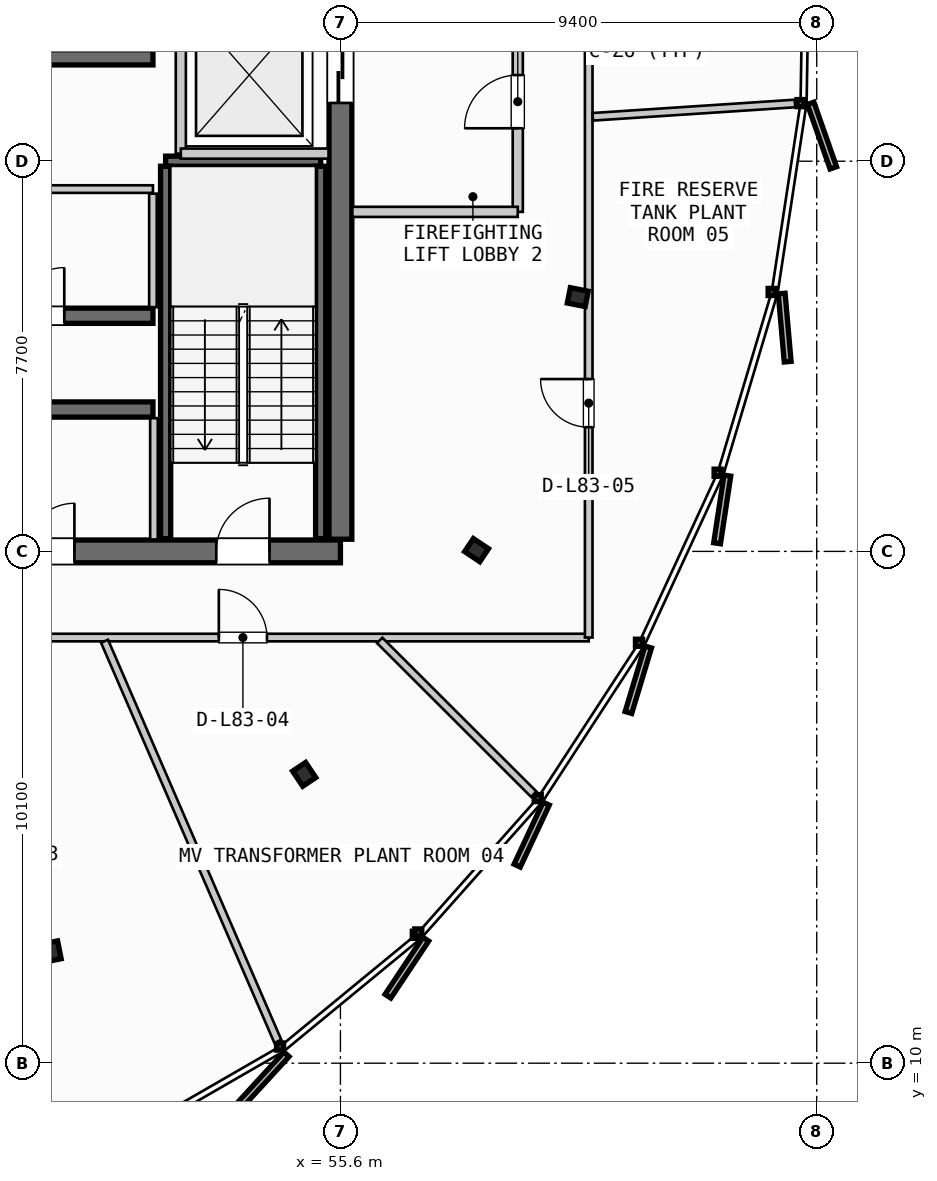
"""IFC4 building model, lengths in metres.
Left out: names, types, materials, properties, quantities, classifications, styles, units other than length and angle.
Written with IfcOpenShell. Run it as: python <this file> out.ifc"""

import sys

from ifc_helpers import new_model, si_unit, direction, frame, frame_2d, origin, origin_2d, place, context, subcontext, project, spatial, rectangle, i_section, extrude, source, transform, mapped, element, fill, save


model = new_model("IFC4")
c1 = context("Model", 3, precision=1e-05, world=origin(), true_north=direction((0.0, 1.0)))
c2 = subcontext(c1, "Body", "Model", "MODEL_VIEW")
j1 = project(units=[si_unit("LENGTHUNIT", "METRE"), si_unit("PLANEANGLEUNIT", "RADIAN")], contexts=[c1])
p1 = place(None, origin())
s1 = spatial("IfcSite", under=j1, at=p1, CompositionType="ELEMENT")
p2 = place(p1, origin())
s2 = spatial("IfcBuilding", under=s1, at=p2, CompositionType="ELEMENT")
p3 = place(p2, frame((0.0, 0.0, 312.3)))
s3 = spatial("IfcBuildingStorey", under=s2, at=p3, CompositionType="ELEMENT", Elevation=312.3)
p4 = place(p3, frame((38.0, 20.1, 0.0), z_axis=(0.0, 0.0, 1.0), x_axis=(1.0, 0.0, 0.0)))
e1 = element("IfcWall", 1, at=p4, inside=s3, PredefinedType="SHEAR", context=c2, shape_type="SweptSolid", body=[
    extrude(rectangle(XDim=17.6, YDim=0.45, at=frame_2d((8.8, 0.0))), origin(), (0.0, 0.0, 1.0), 3.735),
])
p5 = place(p4, frame((1.4, 0.0, 0.0)))
e2 = element("IfcOpeningElement", 2, at=p5, cuts=e1, PredefinedType="OPENING", context=c2, shape_type="SweptSolid", body=[
    extrude(rectangle(XDim=1.05, YDim=2.15, at=frame_2d((0.525, 1.075))), frame((0.0, 0.235, 0.0), z_axis=(0.0, -1.0, 0.0), x_axis=(1.0, 0.0, 0.0)), (0.0, 0.0, 1.0), 0.47),
])
p6 = place(p4, frame((15.15, 0.0, 0.0)))
e3 = element("IfcOpeningElement", 3, at=p6, cuts=e1, PredefinedType="OPENING", context=c2, shape_type="SweptSolid", body=[
    extrude(rectangle(XDim=1.05, YDim=2.15, at=frame_2d((0.525, 1.075))), frame((0.0, 0.235, 0.0), z_axis=(0.0, -1.0, 0.0), x_axis=(1.0, 0.0, 0.0)), (0.0, 0.0, 1.0), 0.47),
])
p7 = place(p4, frame((5.25, 0.0, 0.0)))
e4 = element("IfcOpeningElement", 4, at=p7, cuts=e1, PredefinedType="OPENING", context=c2, shape_type="SweptSolid", body=[
    extrude(rectangle(XDim=0.95, YDim=2.15, at=frame_2d((0.475, 1.075))), frame((0.0, 0.235, 0.0), z_axis=(0.0, -1.0, 0.0), x_axis=(1.0, 0.0, 0.0)), (0.0, 0.0, 1.0), 0.47),
])
p8 = place(p4, frame((11.4, 0.0, 0.0)))
e5 = element("IfcOpeningElement", 5, at=p8, cuts=e1, PredefinedType="OPENING", context=c2, shape_type="SweptSolid", body=[
    extrude(rectangle(XDim=0.95, YDim=2.15, at=frame_2d((0.475, 1.075))), frame((0.0, 0.235, 0.0), z_axis=(0.0, -1.0, 0.0), x_axis=(1.0, 0.0, 0.0)), (0.0, 0.0, 1.0), 0.47),
])
p9 = place(p3, frame((55.6, 20.34, 0.0), z_axis=(0.0, 0.0, 1.0), x_axis=(0.0, 1.0, 0.0)))
e6 = element("IfcWall", 6, at=p9, inside=s3, PredefinedType="SHEAR", context=c2, shape_type="SweptSolid", body=[
    extrude(rectangle(XDim=14.92, YDim=0.45, at=frame_2d((7.46, 0.0))), origin(), (0.0, 0.0, 1.0), 3.735),
])
p10 = place(p9, frame((12.71, 0.0, 0.0)))
e7 = element("IfcOpeningElement", 7, at=p10, cuts=e6, PredefinedType="OPENING", context=c2, shape_type="SweptSolid", body=[
    extrude(rectangle(XDim=1.05, YDim=2.15, at=frame_2d((0.525, 1.075))), frame((0.0, 0.235, 0.0), z_axis=(0.0, -1.0, 0.0), x_axis=(1.0, 0.0, 0.0)), (0.0, 0.0, 1.0), 0.47),
])
p11 = place(p9, frame((8.61, 0.0, 0.0)))
e8 = element("IfcOpeningElement", 8, at=p11, cuts=e6, PredefinedType="OPENING", context=c2, shape_type="SweptSolid", body=[
    extrude(rectangle(XDim=1.1, YDim=2.2, at=frame_2d((0.55, 1.1))), frame((0.0, 0.235, 0.0), z_axis=(0.0, -1.0, 0.0), x_axis=(1.0, 0.0, 0.0)), (0.0, 0.0, 1.0), 0.47),
])
p12 = place(p3, frame((47.65, 22.9, 0.0), z_axis=(0.0, 0.0, 1.0), x_axis=(1.0, 0.0, 0.0)))
e9 = element("IfcWall", 9, at=p12, inside=s3, PredefinedType="SHEAR", context=c2, shape_type="SweptSolid", body=[
    extrude(rectangle(XDim=4.25, YDim=0.3, at=frame_2d((2.125, 0.0))), origin(), (0.0, 0.0, 1.0), 3.735),
])
p13 = place(p3, frame((47.65, 24.75, 0.0), z_axis=(0.0, 0.0, 1.0), x_axis=(1.0, 0.0, 0.0)))
e10 = element("IfcWall", 10, at=p13, inside=s3, PredefinedType="SHEAR", context=c2, shape_type="SweptSolid", body=[
    extrude(rectangle(XDim=4.25, YDim=0.3, at=frame_2d((2.125, 0.0))), origin(), (0.0, 0.0, 1.0), 3.735),
])
p14 = place(p13, frame((1.55, 0.0, 0.0)))
e11 = element("IfcOpeningElement", 11, at=p14, cuts=e10, PredefinedType="OPENING", context=c2, shape_type="SweptSolid", body=[
    extrude(rectangle(XDim=0.95, YDim=2.15, at=frame_2d((0.475, 1.075))), frame((0.0, 0.16, 0.0), z_axis=(0.0, -1.0, 0.0), x_axis=(1.0, 0.0, 0.0)), (0.0, 0.0, 1.0), 0.32),
])
p15 = place(p3, frame((47.65, 29.85, 0.0), z_axis=(0.0, 0.0, 1.0), x_axis=(1.0, 0.0, 0.0)))
e12 = element("IfcWall", 12, at=p15, inside=s3, PredefinedType="SHEAR", context=c2, shape_type="SweptSolid", body=[
    extrude(rectangle(XDim=4.25, YDim=0.3, at=frame_2d((2.125, 0.0))), origin(), (0.0, 0.0, 1.0), 3.735),
])
m1 = source(origin(), c2, "Body", "SweptSolid", [
    extrude(i_section(OverallWidth=0.309, OverallDepth=0.359, WebThickness=0.016, FlangeThickness=0.026, FilletRadius=0.027, at=origin_2d()), origin(), (0.0, 0.0, 1.0), 3.735),
])
for number, where, z_axis, x_axis in (
    (13, (49.902, 12.207, 0.0), (0.0, 0.0, 1.0), (0.195, -0.981, 0.0)),
    (14, (54.885, 15.7, 0.0), (0.0, 0.0, 1.0), (0.556, -0.831, 0.0)),
    (15, (58.287, 20.125, 0.0), (0.0, 0.0, 1.0), (0.831, -0.556, 0.0)),
    (16, (60.284, 25.118, 0.0), (0.0, 0.0, 1.0), (0.981, -0.195, 0.0)),
):
    element("IfcColumn", number, at=place(p3, frame(where, z_axis=z_axis, x_axis=x_axis)), inside=s3, PredefinedType="COLUMN", context=c2, shape_type="MappedRepresentation", body=[
        mapped(m1, transform((0.0, 0.0, 0.0), scale=1.0)),
    ])
p16 = place(p3, frame((52.15, 27.8, 0.0), z_axis=(0.0, 0.0, 1.0), x_axis=(1.0, 0.0, 0.0)))
e17 = element("IfcWall", 17, at=p16, inside=s3, PredefinedType="SHEAR", context=c2, shape_type="SweptSolid", body=[
    extrude(rectangle(XDim=3.06, YDim=0.2, at=frame_2d((1.53, 0.0))), origin(), (0.0, 0.0, 1.0), 3.735),
])
for number, where, z_axis, x_axis in (
    (18, (55.21, 27.7, 0.0), (0.0, 0.0, 1.0), (0.0, -1.0, 0.0)),
    (19, (52.15, 20.35, 0.0), (0.0, 0.0, 1.0), (0.0, 1.0, 0.0)),
):
    element("IfcWall", number, at=place(p3, frame(where, z_axis=z_axis, x_axis=x_axis)), inside=s3, PredefinedType="SHEAR", context=c2, shape_type="SweptSolid", body=[
        extrude(rectangle(XDim=7.35, YDim=0.2, at=frame_2d((3.675, 0.0))), origin(), (0.0, 0.0, 1.0), 3.735),
    ])
p17 = place(p3, frame((52.45, 27.95, 0.0), z_axis=(0.0, 0.0, 1.0), x_axis=(0.0, 1.0, 0.0)))
e20 = element("IfcWall", 20, at=p17, inside=s3, PredefinedType="PARTITIONING", context=c2, shape_type="SweptSolid", body=[
    extrude(rectangle(XDim=3.1, YDim=0.2, at=frame_2d((1.55, 0.0))), origin(), (0.0, 0.0, 1.0), 3.26),
])
p18 = place(p3, frame((52.45, 27.95, 0.0), z_axis=(0.0, 0.0, 1.0), x_axis=(1.0, 0.0, 0.0)))
e21 = element("IfcWall", 21, at=p18, inside=s3, PredefinedType="PARTITIONING", context=c2, shape_type="SweptSolid", body=[
    extrude(rectangle(XDim=2.915, YDim=0.2, at=frame_2d((1.458, 0.0))), origin(), (0.0, 0.0, 1.0), 3.26),
])
p19 = place(p3, frame((59.1, 26.8, 0.0), z_axis=(0.0, 0.0, 1.0), x_axis=(0.0, 1.0, 0.0)))
e22 = element("IfcWall", 22, at=p19, inside=s3, PredefinedType="PARTITIONING", context=c2, shape_type="SweptSolid", body=[
    extrude(rectangle(XDim=4.4, YDim=0.2, at=frame_2d((2.2, 0.0))), origin(), (0.0, 0.0, 1.0), 3.26),
])
p20 = place(p19, frame((1.65, 0.0, 0.0)))
e23 = element("IfcOpeningElement", 23, at=p20, cuts=e22, PredefinedType="OPENING", context=c2, shape_type="SweptSolid", body=[
    extrude(rectangle(XDim=1.05, YDim=2.15, at=frame_2d((0.525, 1.075))), frame((0.0, 0.11, 0.0), z_axis=(0.0, -1.0, 0.0), x_axis=(1.0, 0.0, 0.0)), (0.0, 0.0, 1.0), 0.22),
])
p21 = place(p3, frame((55.835, 26.8, 0.0), z_axis=(0.0, 0.0, 1.0), x_axis=(1.0, 0.0, 0.0)))
e24 = element("IfcWall", 24, at=p21, inside=s3, PredefinedType="PARTITIONING", context=c2, shape_type="SweptSolid", body=[
    extrude(rectangle(XDim=3.265, YDim=0.2, at=frame_2d((1.633, 0.0))), origin(), (0.0, 0.0, 1.0), 3.26),
])
p22 = place(p3, frame((51.92, 20.335, 0.0), z_axis=(0.0, 0.0, 1.0), x_axis=(0.0, 1.0, 0.0)))
e25 = element("IfcWall", 25, at=p22, inside=s3, PredefinedType="PARTITIONING", context=c2, shape_type="SweptSolid", body=[
    extrude(rectangle(XDim=2.395, YDim=0.15, at=frame_2d((1.198, 0.0))), origin(), (0.0, 0.0, 1.0), 3.26),
])
p23 = place(p3, frame((47.65, 27.25, 0.0), z_axis=(0.0, 0.0, 1.0), x_axis=(1.0, 0.0, 0.0)))
e26 = element("IfcWall", 26, at=p23, inside=s3, PredefinedType="PARTITIONING", context=c2, shape_type="SweptSolid", body=[
    extrude(rectangle(XDim=4.25, YDim=0.15, at=frame_2d((2.125, 0.0))), origin(), (0.0, 0.0, 1.0), 3.26),
])
p24 = place(p3, frame((51.9, 24.92, 0.0), z_axis=(0.0, 0.0, 1.0), x_axis=(0.0, 1.0, 0.0)))
e27 = element("IfcWall", 27, at=p24, inside=s3, PredefinedType="PARTITIONING", context=c2, shape_type="SweptSolid", body=[
    extrude(rectangle(XDim=2.24, YDim=0.15, at=frame_2d((1.12, 0.0))), origin(), (0.0, 0.0, 1.0), 3.26),
])
p25 = place(p3, frame((33.1, 18.4, 0.0), z_axis=(0.0, 0.0, 1.0), x_axis=(1.0, 0.0, 0.0)))
e28 = element("IfcWall", 28, at=p25, inside=s3, PredefinedType="PARTITIONING", context=c2, shape_type="SweptSolid", body=[
    extrude(rectangle(XDim=27.4, YDim=0.15, at=frame_2d((13.7, 0.0))), origin(), (0.0, 0.0, 1.0), 3.26),
])
p26 = place(p25, frame((4.068, 0.0, 0.0)))
e29 = element("IfcOpeningElement", 29, at=p26, cuts=e28, PredefinedType="OPENING", context=c2, shape_type="SweptSolid", body=[
    extrude(rectangle(XDim=0.95, YDim=2.15, at=frame_2d((0.475, 1.075))), frame((0.0, 0.085, 0.0), z_axis=(0.0, -1.0, 0.0), x_axis=(1.0, 0.0, 0.0)), (0.0, 0.0, 1.0), 0.17),
])
p27 = place(p25, frame((12.677, 0.0, 0.0)))
e30 = element("IfcOpeningElement", 30, at=p27, cuts=e28, PredefinedType="OPENING", context=c2, shape_type="SweptSolid", body=[
    extrude(rectangle(XDim=0.95, YDim=2.15, at=frame_2d((0.475, 1.075))), frame((0.0, 0.085, 0.0), z_axis=(0.0, -1.0, 0.0), x_axis=(1.0, 0.0, 0.0)), (0.0, 0.0, 1.0), 0.17),
])
p28 = place(p25, frame((20.1, 0.0, 0.0)))
e31 = element("IfcOpeningElement", 31, at=p28, cuts=e28, PredefinedType="OPENING", context=c2, shape_type="SweptSolid", body=[
    extrude(rectangle(XDim=0.95, YDim=2.15, at=frame_2d((0.475, 1.075))), frame((0.0, 0.085, 0.0), z_axis=(0.0, -1.0, 0.0), x_axis=(1.0, 0.0, 0.0)), (0.0, 0.0, 1.0), 0.17),
])
p29 = place(p3, frame((60.5, 18.4, 0.0), z_axis=(0.0, 0.0, 1.0), x_axis=(0.0, 1.0, 0.0)))
e32 = element("IfcWall", 32, at=p29, inside=s3, PredefinedType="PARTITIONING", context=c2, shape_type="SweptSolid", body=[
    extrude(rectangle(XDim=18.8, YDim=0.15, at=frame_2d((9.4, 0.0))), origin(), (0.0, 0.0, 1.0), 3.26),
])
p30 = place(p29, frame((4.151, 0.0, 0.0)))
e33 = element("IfcOpeningElement", 33, at=p30, cuts=e32, PredefinedType="OPENING", context=c2, shape_type="SweptSolid", body=[
    extrude(rectangle(XDim=0.95, YDim=2.15, at=frame_2d((0.475, 1.075))), frame((0.0, 0.085, 0.0), z_axis=(0.0, -1.0, 0.0), x_axis=(1.0, 0.0, 0.0)), (0.0, 0.0, 1.0), 0.17),
])
p31 = place(p29, frame((13.565, 0.0, 0.0)))
e34 = element("IfcOpeningElement", 34, at=p31, cuts=e32, PredefinedType="OPENING", context=c2, shape_type="SweptSolid", body=[
    extrude(rectangle(XDim=0.95, YDim=2.15, at=frame_2d((0.475, 1.075))), frame((0.0, 0.085, 0.0), z_axis=(0.0, -1.0, 0.0), x_axis=(1.0, 0.0, 0.0)), (0.0, 0.0, 1.0), 0.17),
])
p32 = place(p3, frame((50.945, 18.327, 0.0), z_axis=(0.0, 0.0, 1.0), x_axis=(0.39746729675, -0.917616340316, 0.0)))
e35 = element("IfcWall", 35, at=p32, inside=s3, PredefinedType="PARTITIONING", context=c2, shape_type="SweptSolid", body=[
    extrude(rectangle(XDim=8.605, YDim=0.15, at=frame_2d((4.302, 0.0))), origin(), (0.0, 0.0, 1.0), 3.26),
])
p33 = place(p3, frame((56.375, 18.344, 0.0), z_axis=(0.0, 0.0, 1.0), x_axis=(0.707731709482, -0.706481300102, 0.0)))
e36 = element("IfcWall", 36, at=p33, inside=s3, PredefinedType="PARTITIONING", context=c2, shape_type="SweptSolid", body=[
    extrude(rectangle(XDim=4.295, YDim=0.15, at=frame_2d((2.148, 0.0))), origin(), (0.0, 0.0, 1.0), 3.26),
])
p34 = place(p3, frame((60.58, 28.676, 0.0), z_axis=(0.0, 0.0, 1.0), x_axis=(0.99783671246, 0.0657411231, 0.0)))
e37 = element("IfcWall", 37, at=p34, inside=s3, PredefinedType="PARTITIONING", context=c2, shape_type="SweptSolid", body=[
    extrude(rectangle(XDim=4.0, YDim=0.15, at=frame_2d((2.0, 0.0))), origin(), (0.0, 0.0, 1.0), 3.26),
])
m2 = source(origin(), c2, "Body", "SweptSolid", [
    extrude(rectangle(XDim=1.05, YDim=2.15, at=frame_2d((0.525, 1.075))), frame((0.0, 0.025, 0.0), z_axis=(0.0, -1.0, 0.0), x_axis=(1.0, 0.0, 0.0)), (0.0, 0.0, 1.0), 0.05),
])
p35 = place(p6, origin())
e38 = element("IfcDoor", 38, at=p35, inside=s3, OperationType="SINGLE_SWING_RIGHT", PredefinedType="DOOR", context=c2, shape_type="MappedRepresentation", body=[
    mapped(m2, transform((0.0, 0.0, 0.0), scale=1.0)),
])
fill(e3, e38)
m3 = source(origin(), c2, "Body", "SweptSolid", [
    extrude(rectangle(XDim=1.1, YDim=2.2, at=frame_2d((0.55, 1.1))), frame((0.0, 0.025, 0.0), z_axis=(0.0, -1.0, 0.0), x_axis=(1.0, 0.0, 0.0)), (0.0, 0.0, 1.0), 0.05),
])
p36 = place(p11, origin())
e39 = element("IfcDoor", 39, at=p36, inside=s3, OperationType="SLIDING_TO_RIGHT", PredefinedType="DOOR", context=c2, shape_type="MappedRepresentation", body=[
    mapped(m3, transform((0.0, 0.0, 0.0), scale=1.0)),
])
fill(e8, e39)
m4 = source(origin(), c2, "Body", "SweptSolid", [
    extrude(rectangle(XDim=0.95, YDim=2.15, at=frame_2d((0.475, 1.075))), frame((0.0, 0.025, 0.0), z_axis=(0.0, -1.0, 0.0), x_axis=(1.0, 0.0, 0.0)), (0.0, 0.0, 1.0), 0.05),
])
p37 = place(p8, origin())
e40 = element("IfcDoor", 40, at=p37, inside=s3, OperationType="SINGLE_SWING_RIGHT", PredefinedType="DOOR", context=c2, shape_type="MappedRepresentation", body=[
    mapped(m4, transform((0.0, 0.0, 0.0), scale=1.0)),
])
fill(e5, e40)
p38 = place(p14, origin())
e41 = element("IfcDoor", 41, at=p38, inside=s3, OperationType="SINGLE_SWING_RIGHT", PredefinedType="DOOR", context=c2, shape_type="MappedRepresentation", body=[
    mapped(m4, transform((0.0, 0.0, 0.0), scale=1.0)),
])
fill(e11, e41)
p39 = place(p20, origin())
e42 = element("IfcDoor", 42, at=p39, inside=s3, OperationType="SINGLE_SWING_LEFT", PredefinedType="DOOR", context=c2, shape_type="MappedRepresentation", body=[
    mapped(m2, transform((0.0, 0.0, 0.0), scale=1.0)),
])
fill(e23, e42)
p40 = place(p28, origin())
e43 = element("IfcDoor", 43, at=p40, inside=s3, OperationType="SINGLE_SWING_LEFT", PredefinedType="DOOR", context=c2, shape_type="MappedRepresentation", body=[
    mapped(m4, transform((0.0, 0.0, 0.0), scale=1.0)),
])
fill(e31, e43)
p41 = place(p30, origin())
e44 = element("IfcDoor", 44, at=p41, inside=s3, OperationType="SINGLE_SWING_RIGHT", PredefinedType="DOOR", context=c2, shape_type="MappedRepresentation", body=[
    mapped(m4, transform((0.0, 0.0, 0.0), scale=1.0)),
])
fill(e33, e44)
save(model, sys.argv[1])
